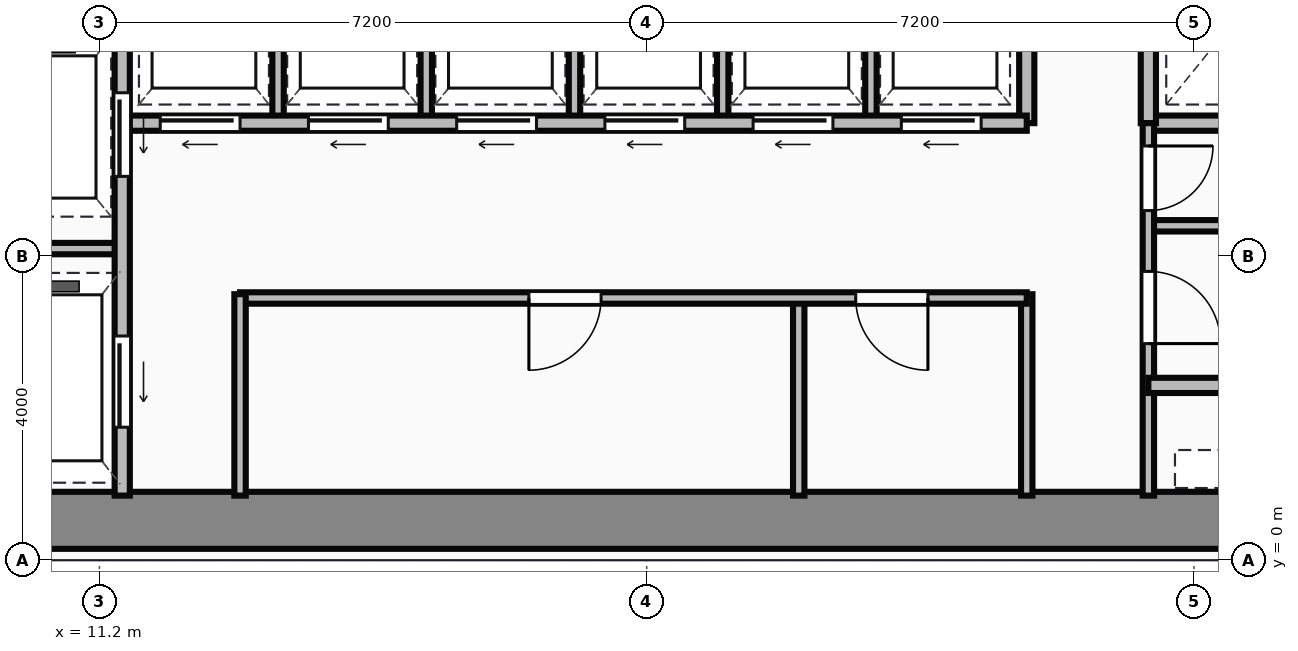
"""IFC4 building model, lengths in metres.
Left out: names, types, materials, properties, quantities, classifications, styles, units other than length and angle.
Written with IfcOpenShell. Run it as: python <this file> out.ifc"""

import sys

from ifc_helpers import new_model, si_unit, direction, frame, frame_2d, origin, place, context, subcontext, project, spatial, rectangle, extrude, source, transform, mapped, element, fill, save


model = new_model("IFC4")
c1 = context("Model", 3, precision=1e-05, world=origin(), true_north=direction((0.0, 1.0)))
c2 = subcontext(c1, "Body", "Model", "MODEL_VIEW")
j1 = project(units=[si_unit("LENGTHUNIT", "METRE"), si_unit("PLANEANGLEUNIT", "RADIAN")], contexts=[c1])
p1 = place(None, origin())
s1 = spatial("IfcSite", under=j1, at=p1, CompositionType="ELEMENT")
p2 = place(p1, origin())
s2 = spatial("IfcBuilding", under=s1, at=p2, CompositionType="ELEMENT")
p3 = place(p2, frame((0.0, 0.0, 106.9)))
s3 = spatial("IfcBuildingStorey", under=s2, at=p3, CompositionType="ELEMENT", Elevation=106.9)
m1 = source(origin(), c2, "Body", "SweptSolid", [
    extrude(rectangle(XDim=29.5, YDim=0.75, at=frame_2d((14.75, 0.0))), origin(), (0.0, 0.0, 1.0), 3.65),
])
p4 = place(p3, frame((4.5, 0.525, 0.0), z_axis=(0.0, 0.0, 1.0), x_axis=(1.0, 0.0, 0.0)))
e1 = element("IfcWall", 1, at=p4, inside=s3, PredefinedType="SHEAR", context=c2, shape_type="MappedRepresentation", body=[
    mapped(m1, transform((0.0, 0.0, 0.0))),
])
m2 = source(origin(), c2, "Body", "SweptSolid", [
    extrude(rectangle(XDim=9.6, YDim=0.2, at=frame_2d((4.8, 0.0))), origin(), (0.0, 0.0, 1.0), 3.4),
])
p5 = place(p3, frame((11.5, 0.85, 0.0), z_axis=(0.0, 0.0, 1.0), x_axis=(0.0, 1.0, 0.0)))
e2 = element("IfcWall", 2, at=p5, inside=s3, PredefinedType="PARTITIONING", context=c2, shape_type="MappedRepresentation", body=[
    mapped(m2, transform((0.0, 0.0, 0.0))),
])
p6 = place(p5, frame((4.2, 0.0, 0.0)))
e3 = element("IfcOpeningElement", 3, at=p6, cuts=e2, PredefinedType="OPENING", context=c2, shape_type="SweptSolid", body=[
    extrude(rectangle(XDim=1.1, YDim=2.15, at=frame_2d((0.55, 1.075))), frame((0.0, 0.11, 0.0), z_axis=(0.0, -1.0, 0.0), x_axis=(1.0, 0.0, 0.0)), (0.0, 0.0, 1.0), 0.22),
])
p7 = place(p5, frame((0.9, 0.0, 0.0)))
e4 = element("IfcOpeningElement", 4, at=p7, cuts=e2, PredefinedType="OPENING", context=c2, shape_type="SweptSolid", body=[
    extrude(rectangle(XDim=1.2, YDim=2.15, at=frame_2d((0.6, 1.075))), frame((0.0, 0.11, 0.0), z_axis=(0.0, -1.0, 0.0), x_axis=(1.0, 0.0, 0.0)), (0.0, 0.0, 1.0), 0.22),
])
m3 = source(origin(), c2, "Body", "SweptSolid", [
    extrude(rectangle(XDim=2.4, YDim=0.15, at=frame_2d((1.2, 0.0))), origin(), (0.0, 0.0, 1.0), 3.4),
])
p8 = place(p3, frame((9.1, 4.1, 0.0), z_axis=(0.0, 0.0, 1.0), x_axis=(1.0, 0.0, 0.0)))
e5 = element("IfcWall", 5, at=p8, inside=s3, PredefinedType="PARTITIONING", context=c2, shape_type="MappedRepresentation", body=[
    mapped(m3, transform((0.0, 0.0, 0.0))),
])
m4 = source(origin(), c2, "Body", "SweptSolid", [
    extrude(rectangle(XDim=2.65, YDim=0.15, at=frame_2d((1.325, 0.0))), origin(), (0.0, 0.0, 1.0), 3.4),
])
p9 = place(p3, frame((13.05, 0.85, 0.0), z_axis=(0.0, 0.0, 1.0), x_axis=(0.0, 1.0, 0.0)))
e6 = element("IfcWall", 6, at=p9, inside=s3, PredefinedType="PARTITIONING", context=c2, shape_type="MappedRepresentation", body=[
    mapped(m4, transform((0.0, 0.0, 0.0))),
])
m5 = source(origin(), c2, "Body", "SweptSolid", [
    extrude(rectangle(XDim=10.35, YDim=0.15, at=frame_2d((5.175, 0.0))), origin(), (0.0, 0.0, 1.0), 3.4),
])
p10 = place(p3, frame((13.05, 3.45, 0.0), z_axis=(0.0, 0.0, 1.0), x_axis=(1.0, 0.0, 0.0)))
e7 = element("IfcWall", 7, at=p10, inside=s3, PredefinedType="PARTITIONING", context=c2, shape_type="MappedRepresentation", body=[
    mapped(m5, transform((0.0, 0.0, 0.0))),
])
p11 = place(p10, frame((3.8, 0.0, 0.0)))
e8 = element("IfcOpeningElement", 8, at=p11, cuts=e7, PredefinedType="OPENING", context=c2, shape_type="SweptSolid", body=[
    extrude(rectangle(XDim=0.95, YDim=2.15, at=frame_2d((0.475, 1.075))), frame((0.0, 0.085, 0.0), z_axis=(0.0, -1.0, 0.0), x_axis=(1.0, 0.0, 0.0)), (0.0, 0.0, 1.0), 0.17),
])
p12 = place(p10, frame((8.1, 0.0, 0.0)))
e9 = element("IfcOpeningElement", 9, at=p12, cuts=e7, PredefinedType="OPENING", context=c2, shape_type="SweptSolid", body=[
    extrude(rectangle(XDim=0.95, YDim=2.15, at=frame_2d((0.475, 1.075))), frame((0.0, 0.085, 0.0), z_axis=(0.0, -1.0, 0.0), x_axis=(1.0, 0.0, 0.0)), (0.0, 0.0, 1.0), 0.17),
])
p13 = place(p3, frame((23.4, 0.85, 0.0), z_axis=(0.0, 0.0, 1.0), x_axis=(0.0, 1.0, 0.0)))
e10 = element("IfcWall", 10, at=p13, inside=s3, PredefinedType="PARTITIONING", context=c2, shape_type="MappedRepresentation", body=[
    mapped(m4, transform((0.0, 0.0, 0.0))),
])
m6 = source(origin(), c2, "Body", "SweptSolid", [
    extrude(rectangle(XDim=2.6, YDim=0.15, at=frame_2d((1.3, 0.0))), origin(), (0.0, 0.0, 1.0), 3.4),
])
p14 = place(p3, frame((20.4, 0.85, 0.0), z_axis=(0.0, 0.0, 1.0), x_axis=(0.0, 1.0, 0.0)))
e11 = element("IfcWall", 11, at=p14, inside=s3, PredefinedType="PARTITIONING", context=c2, shape_type="MappedRepresentation", body=[
    mapped(m6, transform((0.0, 0.0, 0.0))),
])
m7 = source(origin(), c2, "Body", "SweptSolid", [
    extrude(rectangle(XDim=11.85, YDim=0.2, at=frame_2d((5.925, 0.0))), origin(), (0.0, 0.0, 1.0), 3.4),
])
p15 = place(p3, frame((11.55, 5.75, 0.0), z_axis=(0.0, 0.0, 1.0), x_axis=(1.0, 0.0, 0.0)))
e12 = element("IfcWall", 12, at=p15, inside=s3, PredefinedType="PARTITIONING", context=c2, shape_type="MappedRepresentation", body=[
    mapped(m7, transform((0.0, 0.0, 0.0))),
])
p16 = place(p15, frame((0.45, 0.0, 0.0)))
e13 = element("IfcOpeningElement", 13, at=p16, cuts=e12, PredefinedType="OPENING", context=c2, shape_type="SweptSolid", body=[
    extrude(rectangle(XDim=1.05, YDim=2.15, at=frame_2d((0.525, 1.075))), frame((0.0, 0.11, 0.0), z_axis=(0.0, -1.0, 0.0), x_axis=(1.0, 0.0, 0.0)), (0.0, 0.0, 1.0), 0.22),
])
p17 = place(p15, frame((2.4, 0.0, 0.0)))
e14 = element("IfcOpeningElement", 14, at=p17, cuts=e12, PredefinedType="OPENING", context=c2, shape_type="SweptSolid", body=[
    extrude(rectangle(XDim=1.05, YDim=2.15, at=frame_2d((0.525, 1.075))), frame((0.0, 0.11, 0.0), z_axis=(0.0, -1.0, 0.0), x_axis=(1.0, 0.0, 0.0)), (0.0, 0.0, 1.0), 0.22),
])
p18 = place(p15, frame((4.35, 0.0, 0.0)))
e15 = element("IfcOpeningElement", 15, at=p18, cuts=e12, PredefinedType="OPENING", context=c2, shape_type="SweptSolid", body=[
    extrude(rectangle(XDim=1.05, YDim=2.15, at=frame_2d((0.525, 1.075))), frame((0.0, 0.11, 0.0), z_axis=(0.0, -1.0, 0.0), x_axis=(1.0, 0.0, 0.0)), (0.0, 0.0, 1.0), 0.22),
])
p19 = place(p15, frame((6.3, 0.0, 0.0)))
e16 = element("IfcOpeningElement", 16, at=p19, cuts=e12, PredefinedType="OPENING", context=c2, shape_type="SweptSolid", body=[
    extrude(rectangle(XDim=1.05, YDim=2.15, at=frame_2d((0.525, 1.075))), frame((0.0, 0.11, 0.0), z_axis=(0.0, -1.0, 0.0), x_axis=(1.0, 0.0, 0.0)), (0.0, 0.0, 1.0), 0.22),
])
p20 = place(p15, frame((8.25, 0.0, 0.0)))
e17 = element("IfcOpeningElement", 17, at=p20, cuts=e12, PredefinedType="OPENING", context=c2, shape_type="SweptSolid", body=[
    extrude(rectangle(XDim=1.05, YDim=2.15, at=frame_2d((0.525, 1.075))), frame((0.0, 0.11, 0.0), z_axis=(0.0, -1.0, 0.0), x_axis=(1.0, 0.0, 0.0)), (0.0, 0.0, 1.0), 0.22),
])
p21 = place(p15, frame((10.2, 0.0, 0.0)))
e18 = element("IfcOpeningElement", 18, at=p21, cuts=e12, PredefinedType="OPENING", context=c2, shape_type="SweptSolid", body=[
    extrude(rectangle(XDim=1.05, YDim=2.15, at=frame_2d((0.525, 1.075))), frame((0.0, 0.11, 0.0), z_axis=(0.0, -1.0, 0.0), x_axis=(1.0, 0.0, 0.0)), (0.0, 0.0, 1.0), 0.22),
])
m8 = source(origin(), c2, "Body", "SweptSolid", [
    extrude(rectangle(XDim=2.6, YDim=0.2, at=frame_2d((1.3, 0.0))), origin(), (0.0, 0.0, 1.0), 3.4),
])
p22 = place(p3, frame((23.4, 5.75, 0.0), z_axis=(0.0, 0.0, 1.0), x_axis=(0.0, 1.0, 0.0)))
e19 = element("IfcWall", 19, at=p22, inside=s3, PredefinedType="PARTITIONING", context=c2, shape_type="MappedRepresentation", body=[
    mapped(m8, transform((0.0, 0.0, 0.0))),
])
m9 = source(origin(), c2, "Body", "SweptSolid", [
    extrude(rectangle(XDim=2.5, YDim=0.15, at=frame_2d((1.25, 0.0))), origin(), (0.0, 0.0, 1.0), 3.4),
])
for number, where, z_axis, x_axis in (
    (20, (13.55, 5.8, 0.0), (0.0, 0.0, 1.0), (0.0, 1.0, 0.0)),
    (21, (15.5, 5.8, 0.0), (0.0, 0.0, 1.0), (0.0, 1.0, 0.0)),
    (22, (17.45, 5.8, 0.0), (0.0, 0.0, 1.0), (0.0, 1.0, 0.0)),
    (23, (19.4, 5.8, 0.0), (0.0, 0.0, 1.0), (0.0, 1.0, 0.0)),
    (24, (21.35, 5.8, 0.0), (0.0, 0.0, 1.0), (0.0, 1.0, 0.0)),
):
    element("IfcWall", number, at=place(p3, frame(where, z_axis=z_axis, x_axis=x_axis)), inside=s3, PredefinedType="PARTITIONING", context=c2, shape_type="MappedRepresentation", body=[
        mapped(m9, transform((0.0, 0.0, 0.0))),
    ])
m10 = source(origin(), c2, "Body", "SweptSolid", [
    extrude(rectangle(XDim=4.55, YDim=0.2, at=frame_2d((2.275, 0.0))), origin(), (0.0, 0.0, 1.0), 3.4),
])
p23 = place(p3, frame((25.0, 5.75, 0.0), z_axis=(0.0, 0.0, 1.0), x_axis=(1.0, 0.0, 0.0)))
e25 = element("IfcWall", 25, at=p23, inside=s3, PredefinedType="PARTITIONING", context=c2, shape_type="MappedRepresentation", body=[
    mapped(m10, transform((0.0, 0.0, 0.0))),
])
p24 = place(p3, frame((25.0, 5.75, 0.0), z_axis=(0.0, 0.0, 1.0), x_axis=(0.0, 1.0, 0.0)))
e26 = element("IfcWall", 26, at=p24, inside=s3, PredefinedType="PARTITIONING", context=c2, shape_type="MappedRepresentation", body=[
    mapped(m8, transform((0.0, 0.0, 0.0))),
])
m11 = source(origin(), c2, "Body", "SweptSolid", [
    extrude(rectangle(XDim=4.9, YDim=0.15, at=frame_2d((2.45, 0.0))), origin(), (0.0, 0.0, 1.0), 3.4),
])
p25 = place(p3, frame((25.0, 0.85, 0.0), z_axis=(0.0, 0.0, 1.0), x_axis=(0.0, 1.0, 0.0)))
e27 = element("IfcWall", 27, at=p25, inside=s3, PredefinedType="PARTITIONING", context=c2, shape_type="MappedRepresentation", body=[
    mapped(m11, transform((0.0, 0.0, 0.0))),
])
p26 = place(p25, frame((2.0, 0.0, 0.0)))
e28 = element("IfcOpeningElement", 28, at=p26, cuts=e27, PredefinedType="OPENING", context=c2, shape_type="SweptSolid", body=[
    extrude(rectangle(XDim=0.95, YDim=2.15, at=frame_2d((0.475, 1.075))), frame((0.0, 0.085, 0.0), z_axis=(0.0, -1.0, 0.0), x_axis=(1.0, 0.0, 0.0)), (0.0, 0.0, 1.0), 0.17),
])
p27 = place(p25, frame((3.75, 0.0, 0.0)))
e29 = element("IfcOpeningElement", 29, at=p27, cuts=e27, PredefinedType="OPENING", context=c2, shape_type="SweptSolid", body=[
    extrude(rectangle(XDim=0.85, YDim=2.15, at=frame_2d((0.425, 1.075))), frame((0.0, 0.085, 0.0), z_axis=(0.0, -1.0, 0.0), x_axis=(1.0, 0.0, 0.0)), (0.0, 0.0, 1.0), 0.17),
])
m12 = source(origin(), c2, "Body", "SweptSolid", [
    extrude(rectangle(XDim=2.4, YDim=0.2, at=frame_2d((1.2, 0.0))), origin(), (0.0, 0.0, 1.0), 3.4),
])
p28 = place(p3, frame((25.0, 2.3, 0.0), z_axis=(0.0, 0.0, 1.0), x_axis=(1.0, 0.0, 0.0)))
e30 = element("IfcWall", 30, at=p28, inside=s3, PredefinedType="PARTITIONING", context=c2, shape_type="MappedRepresentation", body=[
    mapped(m12, transform((0.0, 0.0, 0.0))),
])
m13 = source(origin(), c2, "Body", "SweptSolid", [
    extrude(rectangle(XDim=4.55, YDim=0.15, at=frame_2d((2.275, 0.0))), origin(), (0.0, 0.0, 1.0), 3.4),
])
p29 = place(p3, frame((25.0, 4.4, 0.0), z_axis=(0.0, 0.0, 1.0), x_axis=(1.0, 0.0, 0.0)))
e31 = element("IfcWall", 31, at=p29, inside=s3, PredefinedType="PARTITIONING", context=c2, shape_type="MappedRepresentation", body=[
    mapped(m13, transform((0.0, 0.0, 0.0))),
])
m14 = source(origin(), c2, "Body", "SweptSolid", [
    extrude(rectangle(XDim=1.1, YDim=2.15, at=frame_2d((0.55, 1.075))), frame((0.0, 0.025, 0.0), z_axis=(0.0, -1.0, 0.0), x_axis=(1.0, 0.0, 0.0)), (0.0, 0.0, 1.0), 0.05),
])
p30 = place(p6, frame((1.1, 0.0, 0.0), z_axis=(0.0, 0.0, 1.0), x_axis=(-1.0, 0.0, 0.0)))
e32 = element("IfcDoor", 32, at=p30, inside=s3, OperationType="SLIDING_TO_LEFT", PredefinedType="DOOR", context=c2, shape_type="MappedRepresentation", body=[
    mapped(m14, transform((0.0, 0.0, 0.0))),
])
fill(e3, e32)
m15 = source(origin(), c2, "Body", "SweptSolid", [
    extrude(rectangle(XDim=1.2, YDim=2.15, at=frame_2d((0.6, 1.075))), frame((0.0, 0.025, 0.0), z_axis=(0.0, -1.0, 0.0), x_axis=(1.0, 0.0, 0.0)), (0.0, 0.0, 1.0), 0.05),
])
p31 = place(p7, frame((1.2, 0.0, 0.0), z_axis=(0.0, 0.0, 1.0), x_axis=(-1.0, 0.0, 0.0)))
e33 = element("IfcDoor", 33, at=p31, inside=s3, OperationType="SLIDING_TO_LEFT", PredefinedType="DOOR", context=c2, shape_type="MappedRepresentation", body=[
    mapped(m15, transform((0.0, 0.0, 0.0))),
])
fill(e4, e33)
m16 = source(origin(), c2, "Body", "SweptSolid", [
    extrude(rectangle(XDim=0.95, YDim=2.15, at=frame_2d((0.475, 1.075))), frame((0.0, 0.025, 0.0), z_axis=(0.0, -1.0, 0.0), x_axis=(1.0, 0.0, 0.0)), (0.0, 0.0, 1.0), 0.05),
])
p32 = place(p11, origin())
e34 = element("IfcDoor", 34, at=p32, inside=s3, OperationType="SINGLE_SWING_LEFT", PredefinedType="DOOR", context=c2, shape_type="MappedRepresentation", body=[
    mapped(m16, transform((0.0, 0.0, 0.0))),
])
fill(e8, e34)
p33 = place(p12, origin())
e35 = element("IfcDoor", 35, at=p33, inside=s3, OperationType="SINGLE_SWING_RIGHT", PredefinedType="DOOR", context=c2, shape_type="MappedRepresentation", body=[
    mapped(m16, transform((0.0, 0.0, 0.0))),
])
fill(e9, e35)
m17 = source(origin(), c2, "Body", "SweptSolid", [
    extrude(rectangle(XDim=1.05, YDim=2.15, at=frame_2d((0.525, 1.075))), frame((0.0, 0.025, 0.0), z_axis=(0.0, -1.0, 0.0), x_axis=(1.0, 0.0, 0.0)), (0.0, 0.0, 1.0), 0.05),
])
p34 = place(p16, frame((1.05, 0.0, 0.0), z_axis=(0.0, 0.0, 1.0), x_axis=(-1.0, 0.0, 0.0)))
e36 = element("IfcDoor", 36, at=p34, inside=s3, OperationType="SLIDING_TO_LEFT", PredefinedType="DOOR", context=c2, shape_type="MappedRepresentation", body=[
    mapped(m17, transform((0.0, 0.0, 0.0))),
])
fill(e13, e36)
p35 = place(p17, frame((1.05, 0.0, 0.0), z_axis=(0.0, 0.0, 1.0), x_axis=(-1.0, 0.0, 0.0)))
e37 = element("IfcDoor", 37, at=p35, inside=s3, OperationType="SLIDING_TO_LEFT", PredefinedType="DOOR", context=c2, shape_type="MappedRepresentation", body=[
    mapped(m17, transform((0.0, 0.0, 0.0))),
])
fill(e14, e37)
p36 = place(p18, frame((1.05, 0.0, 0.0), z_axis=(0.0, 0.0, 1.0), x_axis=(-1.0, 0.0, 0.0)))
e38 = element("IfcDoor", 38, at=p36, inside=s3, OperationType="SLIDING_TO_LEFT", PredefinedType="DOOR", context=c2, shape_type="MappedRepresentation", body=[
    mapped(m17, transform((0.0, 0.0, 0.0))),
])
fill(e15, e38)
p37 = place(p19, frame((1.05, 0.0, 0.0), z_axis=(0.0, 0.0, 1.0), x_axis=(-1.0, 0.0, 0.0)))
e39 = element("IfcDoor", 39, at=p37, inside=s3, OperationType="SLIDING_TO_LEFT", PredefinedType="DOOR", context=c2, shape_type="MappedRepresentation", body=[
    mapped(m17, transform((0.0, 0.0, 0.0))),
])
fill(e16, e39)
p38 = place(p20, frame((1.05, 0.0, 0.0), z_axis=(0.0, 0.0, 1.0), x_axis=(-1.0, 0.0, 0.0)))
e40 = element("IfcDoor", 40, at=p38, inside=s3, OperationType="SLIDING_TO_LEFT", PredefinedType="DOOR", context=c2, shape_type="MappedRepresentation", body=[
    mapped(m17, transform((0.0, 0.0, 0.0))),
])
fill(e17, e40)
p39 = place(p21, frame((1.05, 0.0, 0.0), z_axis=(0.0, 0.0, 1.0), x_axis=(-1.0, 0.0, 0.0)))
e41 = element("IfcDoor", 41, at=p39, inside=s3, OperationType="SLIDING_TO_LEFT", PredefinedType="DOOR", context=c2, shape_type="MappedRepresentation", body=[
    mapped(m17, transform((0.0, 0.0, 0.0))),
])
fill(e18, e41)
p40 = place(p26, origin())
e42 = element("IfcDoor", 42, at=p40, inside=s3, OperationType="SINGLE_SWING_LEFT", PredefinedType="DOOR", context=c2, shape_type="MappedRepresentation", body=[
    mapped(m16, transform((0.0, 0.0, 0.0))),
])
fill(e28, e42)
m18 = source(origin(), c2, "Body", "SweptSolid", [
    extrude(rectangle(XDim=0.85, YDim=2.15, at=frame_2d((0.425, 1.075))), frame((0.0, 0.025, 0.0), z_axis=(0.0, -1.0, 0.0), x_axis=(1.0, 0.0, 0.0)), (0.0, 0.0, 1.0), 0.05),
])
p41 = place(p27, origin())
e43 = element("IfcDoor", 43, at=p41, inside=s3, OperationType="SINGLE_SWING_RIGHT", PredefinedType="DOOR", context=c2, shape_type="MappedRepresentation", body=[
    mapped(m18, transform((0.0, 0.0, 0.0))),
])
fill(e29, e43)
save(model, sys.argv[1])
